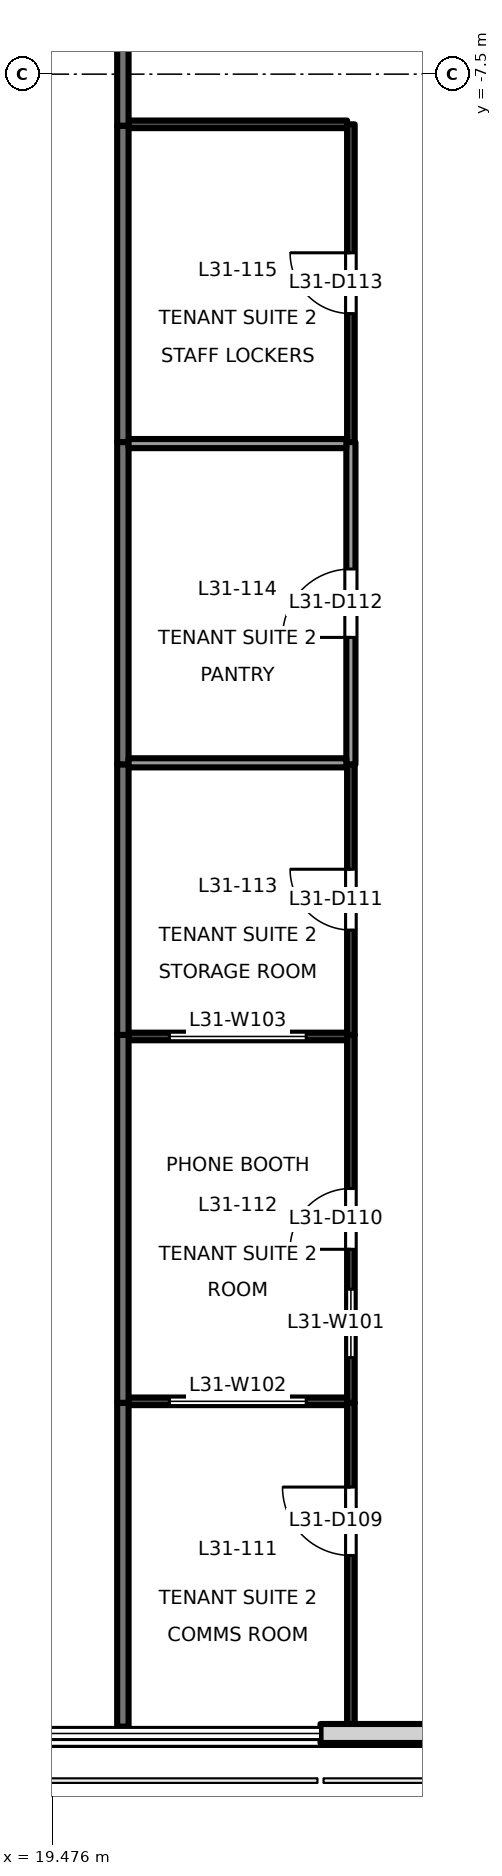
"""IFC4 building model, lengths in metres.
Left out: names, types, materials, properties, quantities, classifications, styles, units other than length and angle.
Written with IfcOpenShell. Run it as: python <this file> out.ifc"""

import sys

from ifc_helpers import new_model, si_unit, direction, frame, frame_2d, origin, place, context, subcontext, project, spatial, rectangle, extrude, element, fill, save


model = new_model("IFC4")
c1 = context("Model", 3, precision=1e-05, world=origin(), true_north=direction((0.0, 1.0)))
c2 = subcontext(c1, "Body", "Model", "MODEL_VIEW")
j1 = project(units=[si_unit("LENGTHUNIT", "METRE"), si_unit("PLANEANGLEUNIT", "RADIAN")], contexts=[c1])
p1 = place(None, origin())
s1 = spatial("IfcSite", under=j1, at=p1, CompositionType="ELEMENT")
p2 = place(p1, origin())
s2 = spatial("IfcBuilding", under=s1, at=p2, CompositionType="ELEMENT")
p3 = place(p2, frame((0.0, 0.0, 138.1)))
s3 = spatial("IfcBuildingStorey", under=s2, at=p3, CompositionType="ELEMENT", Elevation=138.1)
p4 = place(p3, frame((23.0, -29.33, 0.0), z_axis=(0.0, 0.0, 1.0), x_axis=(1.0, 0.0, 0.0)))
e1 = element("IfcWall", 1, at=p4, inside=s3, PredefinedType="SOLIDWALL", context=c2, shape_type="SweptSolid", body=[
    extrude(rectangle(XDim=2.705, YDim=0.25, at=frame_2d((1.353, 0.0))), origin(), (0.0, 0.0, 1.0), 3.8),
])
p5 = place(p3, frame((20.4, -2.14, 0.0), z_axis=(0.0, 0.0, 1.0), x_axis=(0.0, -1.0, 0.0)))
e2 = element("IfcWall", 2, at=p5, inside=s3, PredefinedType="PARTITIONING", context=c2, shape_type="SweptSolid", body=[
    extrude(rectangle(XDim=6.04, YDim=0.15, at=frame_2d((3.02, 0.0))), origin(), (0.0, 0.0, 1.0), 3.3),
])
p6 = place(p5, frame((3.055, 0.0, 0.0)))
e3 = element("IfcOpeningElement", 3, at=p6, cuts=e2, PredefinedType="OPENING", context=c2, shape_type="SweptSolid", body=[
    extrude(rectangle(XDim=1.8, YDim=2.1, at=frame_2d((0.9, 1.05))), frame((0.0, 0.085, 0.0), z_axis=(0.0, -1.0, 0.0), x_axis=(1.0, 0.0, 0.0)), (0.0, 0.0, 1.0), 0.171),
])
p7 = place(p3, frame((20.4, -24.98, 0.0), z_axis=(0.0, 0.0, 1.0), x_axis=(0.0, -1.0, 0.0)))
e4 = element("IfcWall", 4, at=p7, inside=s3, PredefinedType="PARTITIONING", context=c2, shape_type="SweptSolid", body=[
    extrude(rectangle(XDim=4.26, YDim=0.15, at=frame_2d((2.13, 0.0))), origin(), (0.0, 0.0, 1.0), 3.8),
])
p8 = place(p3, frame((20.4, -20.14, 0.0), z_axis=(0.0, 0.0, 1.0), x_axis=(0.0, -1.0, 0.0)))
e5 = element("IfcWall", 5, at=p8, inside=s3, PredefinedType="PARTITIONING", context=c2, shape_type="SweptSolid", body=[
    extrude(rectangle(XDim=4.84, YDim=0.15, at=frame_2d((2.42, 0.0))), origin(), (0.0, 0.0, 1.0), 3.8),
])
p9 = place(p3, frame((20.4, -16.58, 0.0), z_axis=(0.0, 0.0, 1.0), x_axis=(0.0, -1.0, 0.0)))
e6 = element("IfcWall", 6, at=p9, inside=s3, PredefinedType="PARTITIONING", context=c2, shape_type="SweptSolid", body=[
    extrude(rectangle(XDim=3.56, YDim=0.15, at=frame_2d((1.78, 0.0))), origin(), (0.0, 0.0, 1.0), 3.8),
])
p10 = place(p3, frame((20.4, -12.34, 0.0), z_axis=(0.0, 0.0, 1.0), x_axis=(0.0, -1.0, 0.0)))
e7 = element("IfcWall", 7, at=p10, inside=s3, PredefinedType="PARTITIONING", context=c2, shape_type="SweptSolid", body=[
    extrude(rectangle(XDim=4.24, YDim=0.15, at=frame_2d((2.12, 0.0))), origin(), (0.0, 0.0, 1.0), 3.8),
])
p11 = place(p3, frame((20.4, -8.18, 0.0), z_axis=(0.0, 0.0, 1.0), x_axis=(0.0, -1.0, 0.0)))
e8 = element("IfcWall", 8, at=p11, inside=s3, PredefinedType="PARTITIONING", context=c2, shape_type="SweptSolid", body=[
    extrude(rectangle(XDim=4.16, YDim=0.15, at=frame_2d((2.08, 0.0))), origin(), (0.0, 0.0, 1.0), 3.8),
])
p12 = place(p3, frame((23.4, -29.24, 0.0), z_axis=(0.0, 0.0, 1.0), x_axis=(0.0, 1.0, 0.0)))
e9 = element("IfcWall", 9, at=p12, inside=s3, PredefinedType="PARTITIONING", context=c2, shape_type="SweptSolid", body=[
    extrude(rectangle(XDim=4.26, YDim=0.1, at=frame_2d((2.13, 0.0))), origin(), (0.0, 0.0, 1.0), 3.8),
])
p13 = place(p12, frame((2.252, 0.0, 0.0)))
e10 = element("IfcOpeningElement", 10, at=p13, cuts=e9, PredefinedType="OPENING", context=c2, shape_type="SweptSolid", body=[
    extrude(rectangle(XDim=0.9, YDim=2.1, at=frame_2d((0.45, 1.05))), frame((0.0, 0.061, 0.0), z_axis=(0.0, -1.0, 0.0), x_axis=(1.0, 0.0, 0.0)), (0.0, 0.0, 1.0), 0.121),
])
p14 = place(p3, frame((23.4, -24.98, 0.0), z_axis=(0.0, 0.0, 1.0), x_axis=(0.0, 1.0, 0.0)))
e11 = element("IfcWall", 11, at=p14, inside=s3, PredefinedType="PARTITIONING", context=c2, shape_type="SweptSolid", body=[
    extrude(rectangle(XDim=4.84, YDim=0.1, at=frame_2d((2.42, 0.0))), origin(), (0.0, 0.0, 1.0), 3.8),
])
p15 = place(p14, frame((2.02, 0.0, 0.0)))
e12 = element("IfcOpeningElement", 12, at=p15, cuts=e11, PredefinedType="OPENING", context=c2, shape_type="SweptSolid", body=[
    extrude(rectangle(XDim=0.8, YDim=2.1, at=frame_2d((0.4, 1.05))), frame((0.0, 0.061, 0.0), z_axis=(0.0, -1.0, 0.0), x_axis=(1.0, 0.0, 0.0)), (0.0, 0.0, 1.0), 0.121),
])
p16 = place(p14, frame((0.595, 0.0, 0.9)))
e13 = element("IfcOpeningElement", 13, at=p16, cuts=e11, PredefinedType="OPENING", context=c2, shape_type="SweptSolid", body=[
    extrude(rectangle(XDim=0.9, YDim=1.2, at=frame_2d((0.45, 0.6))), frame((0.0, 0.061, 0.0), z_axis=(0.0, -1.0, 0.0), x_axis=(1.0, 0.0, 0.0)), (0.0, 0.0, 1.0), 0.121),
])
p17 = place(p3, frame((23.4, -20.14, 0.0), z_axis=(0.0, 0.0, 1.0), x_axis=(0.0, 1.0, 0.0)))
e14 = element("IfcWall", 14, at=p17, inside=s3, PredefinedType="PARTITIONING", context=c2, shape_type="SweptSolid", body=[
    extrude(rectangle(XDim=3.56, YDim=0.1, at=frame_2d((1.78, 0.0))), origin(), (0.0, 0.0, 1.0), 3.8),
])
p18 = place(p17, frame((1.38, 0.0, 0.0)))
e15 = element("IfcOpeningElement", 15, at=p18, cuts=e14, PredefinedType="OPENING", context=c2, shape_type="SweptSolid", body=[
    extrude(rectangle(XDim=0.8, YDim=2.1, at=frame_2d((0.4, 1.05))), frame((0.0, 0.061, 0.0), z_axis=(0.0, -1.0, 0.0), x_axis=(1.0, 0.0, 0.0)), (0.0, 0.0, 1.0), 0.121),
])
p19 = place(p3, frame((23.4, -16.58, 0.0), z_axis=(0.0, 0.0, 1.0), x_axis=(0.0, 1.0, 0.0)))
e16 = element("IfcWall", 16, at=p19, inside=s3, PredefinedType="PARTITIONING", context=c2, shape_type="SweptSolid", body=[
    extrude(rectangle(XDim=4.24, YDim=0.12, at=frame_2d((2.12, 0.0))), origin(), (0.0, 0.0, 1.0), 3.8),
])
p20 = place(p19, frame((1.67, 0.0, 0.0)))
e17 = element("IfcOpeningElement", 17, at=p20, cuts=e16, PredefinedType="OPENING", context=c2, shape_type="SweptSolid", body=[
    extrude(rectangle(XDim=0.9, YDim=2.1, at=frame_2d((0.45, 1.05))), frame((0.0, 0.071, 0.0), z_axis=(0.0, -1.0, 0.0), x_axis=(1.0, 0.0, 0.0)), (0.0, 0.0, 1.0), 0.141),
])
p21 = place(p3, frame((23.35, -8.16, 0.0), z_axis=(0.0, 0.0, 1.0), x_axis=(-1.0, 0.0, 0.0)))
e18 = element("IfcWall", 18, at=p21, inside=s3, PredefinedType="PARTITIONING", context=c2, shape_type="SweptSolid", body=[
    extrude(rectangle(XDim=2.875, YDim=0.1, at=frame_2d((1.438, 0.0))), origin(), (0.0, 0.0, 1.0), 3.8),
])
p22 = place(p3, frame((23.4, -12.34, 0.0), z_axis=(0.0, 0.0, 1.0), x_axis=(0.0, 1.0, 0.0)))
e19 = element("IfcWall", 19, at=p22, inside=s3, PredefinedType="PARTITIONING", context=c2, shape_type="SweptSolid", body=[
    extrude(rectangle(XDim=4.18, YDim=0.1, at=frame_2d((2.09, 0.0))), origin(), (0.0, 0.0, 1.0), 3.8),
])
p23 = place(p22, frame((1.69, 0.0, 0.0)))
e20 = element("IfcOpeningElement", 20, at=p23, cuts=e19, PredefinedType="OPENING", context=c2, shape_type="SweptSolid", body=[
    extrude(rectangle(XDim=0.8, YDim=2.1, at=frame_2d((0.4, 1.05))), frame((0.0, 0.061, 0.0), z_axis=(0.0, -1.0, 0.0), x_axis=(1.0, 0.0, 0.0)), (0.0, 0.0, 1.0), 0.121),
])
p24 = place(p3, frame((20.475, -24.96, 0.0), z_axis=(0.0, 0.0, 1.0), x_axis=(1.0, 0.0, 0.0)))
e21 = element("IfcWall", 21, at=p24, inside=s3, PredefinedType="PARTITIONING", context=c2, shape_type="SweptSolid", body=[
    extrude(rectangle(XDim=2.875, YDim=0.1, at=frame_2d((1.438, 0.0))), origin(), (0.0, 0.0, 1.0), 3.8),
])
p25 = place(p24, frame((0.537, 0.0, 0.9)))
e22 = element("IfcOpeningElement", 22, at=p25, cuts=e21, PredefinedType="OPENING", context=c2, shape_type="SweptSolid", body=[
    extrude(rectangle(XDim=1.8, YDim=1.2, at=frame_2d((0.9, 0.6))), frame((0.0, 0.061, 0.0), z_axis=(0.0, -1.0, 0.0), x_axis=(1.0, 0.0, 0.0)), (0.0, 0.0, 1.0), 0.121),
])
p26 = place(p3, frame((20.475, -20.16, 0.0), z_axis=(0.0, 0.0, 1.0), x_axis=(1.0, 0.0, 0.0)))
e23 = element("IfcWall", 23, at=p26, inside=s3, PredefinedType="PARTITIONING", context=c2, shape_type="SweptSolid", body=[
    extrude(rectangle(XDim=2.875, YDim=0.1, at=frame_2d((1.438, 0.0))), origin(), (0.0, 0.0, 1.0), 3.8),
])
p27 = place(p26, frame((0.537, 0.0, 0.9)))
e24 = element("IfcOpeningElement", 24, at=p27, cuts=e23, PredefinedType="OPENING", context=c2, shape_type="SweptSolid", body=[
    extrude(rectangle(XDim=1.8, YDim=1.2, at=frame_2d((0.9, 0.6))), frame((0.0, 0.061, 0.0), z_axis=(0.0, -1.0, 0.0), x_axis=(1.0, 0.0, 0.0)), (0.0, 0.0, 1.0), 0.121),
])
for number, where, z_axis, x_axis in (
    (25, (20.475, -16.56, 0.0), (0.0, 0.0, 1.0), (1.0, 0.0, 0.0)),
    (26, (20.475, -12.36, 0.0), (0.0, 0.0, 1.0), (1.0, 0.0, 0.0)),
):
    element("IfcWall", number, at=place(p3, frame(where, z_axis=z_axis, x_axis=x_axis)), inside=s3, PredefinedType="PARTITIONING", context=c2, shape_type="SweptSolid", body=[
        extrude(rectangle(XDim=2.865, YDim=0.12, at=frame_2d((1.433, 0.0))), origin(), (0.0, 0.0, 1.0), 3.8),
    ])
p28 = place(p13, origin())
e27 = element("IfcDoor", 27, at=p28, inside=s3, OperationType="SINGLE_SWING_RIGHT", PredefinedType="DOOR", context=c2, shape_type="SweptSolid", body=[
    extrude(rectangle(XDim=0.9, YDim=2.1, at=frame_2d((0.45, 1.05))), frame((0.0, 0.025, 0.0), z_axis=(0.0, -1.0, 0.0), x_axis=(1.0, 0.0, 0.0)), (0.0, 0.0, 1.0), 0.05),
])
fill(e10, e27)
p29 = place(p15, origin())
e28 = element("IfcDoor", 28, at=p29, inside=s3, OperationType="SINGLE_SWING_LEFT", PredefinedType="DOOR", context=c2, shape_type="SweptSolid", body=[
    extrude(rectangle(XDim=0.8, YDim=2.1, at=frame_2d((0.4, 1.05))), frame((0.0, 0.025, 0.0), z_axis=(0.0, -1.0, 0.0), x_axis=(1.0, 0.0, 0.0)), (0.0, 0.0, 1.0), 0.05),
])
fill(e12, e28)
p30 = place(p18, origin())
e29 = element("IfcDoor", 29, at=p30, inside=s3, OperationType="SINGLE_SWING_RIGHT", PredefinedType="DOOR", context=c2, shape_type="SweptSolid", body=[
    extrude(rectangle(XDim=0.8, YDim=2.1, at=frame_2d((0.4, 1.05))), frame((0.0, 0.025, 0.0), z_axis=(0.0, -1.0, 0.0), x_axis=(1.0, 0.0, 0.0)), (0.0, 0.0, 1.0), 0.05),
])
fill(e15, e29)
p31 = place(p20, origin())
e30 = element("IfcDoor", 30, at=p31, inside=s3, OperationType="SINGLE_SWING_LEFT", PredefinedType="DOOR", context=c2, shape_type="SweptSolid", body=[
    extrude(rectangle(XDim=0.9, YDim=2.1, at=frame_2d((0.45, 1.05))), frame((0.0, 0.025, 0.0), z_axis=(0.0, -1.0, 0.0), x_axis=(1.0, 0.0, 0.0)), (0.0, 0.0, 1.0), 0.05),
])
fill(e17, e30)
p32 = place(p23, origin())
e31 = element("IfcDoor", 31, at=p32, inside=s3, OperationType="SINGLE_SWING_RIGHT", PredefinedType="DOOR", context=c2, shape_type="SweptSolid", body=[
    extrude(rectangle(XDim=0.8, YDim=2.1, at=frame_2d((0.4, 1.05))), frame((0.0, 0.025, 0.0), z_axis=(0.0, -1.0, 0.0), x_axis=(1.0, 0.0, 0.0)), (0.0, 0.0, 1.0), 0.05),
])
fill(e20, e31)
p33 = place(p16, origin())
e32 = element("IfcWindow", 32, at=p33, inside=s3, PartitioningType="SINGLE_PANEL", PredefinedType="WINDOW", context=c2, shape_type="SweptSolid", body=[
    extrude(rectangle(XDim=0.9, YDim=1.2, at=frame_2d((0.45, 0.6))), frame((0.0, 0.03, 0.0), z_axis=(0.0, -1.0, 0.0), x_axis=(1.0, 0.0, 0.0)), (0.0, 0.0, 1.0), 0.06),
])
fill(e13, e32)
p34 = place(p25, origin())
e33 = element("IfcWindow", 33, at=p34, inside=s3, PartitioningType="SINGLE_PANEL", PredefinedType="WINDOW", context=c2, shape_type="SweptSolid", body=[
    extrude(rectangle(XDim=1.8, YDim=1.2, at=frame_2d((0.9, 0.6))), frame((0.0, 0.03, 0.0), z_axis=(0.0, -1.0, 0.0), x_axis=(1.0, 0.0, 0.0)), (0.0, 0.0, 1.0), 0.06),
])
fill(e22, e33)
p35 = place(p27, origin())
e34 = element("IfcWindow", 34, at=p35, inside=s3, PartitioningType="SINGLE_PANEL", PredefinedType="WINDOW", context=c2, shape_type="SweptSolid", body=[
    extrude(rectangle(XDim=1.8, YDim=1.2, at=frame_2d((0.9, 0.6))), frame((0.0, 0.03, 0.0), z_axis=(0.0, -1.0, 0.0), x_axis=(1.0, 0.0, 0.0)), (0.0, 0.0, 1.0), 0.06),
])
fill(e24, e34)
save(model, sys.argv[1])
